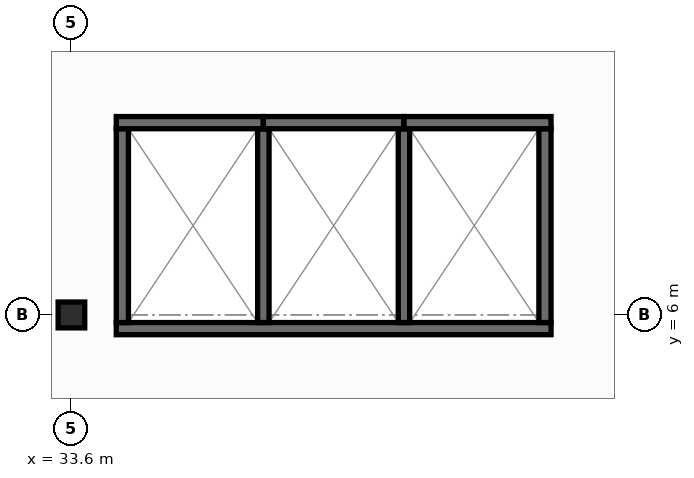
"""IFC4 building model, lengths in metres.
Left out: names, types, materials, properties, quantities, classifications, styles, units other than length and angle.
Written with IfcOpenShell. Run it as: python <this file> out.ifc"""

import sys

from ifc_helpers import new_model, si_unit, direction, frame, frame_2d, origin, origin_2d, place, context, subcontext, project, spatial, rectangle, i_section, extrude, element, save


model = new_model("IFC4")
c1 = context("Model", 3, precision=1e-05, world=origin(), true_north=direction((0.0, 1.0)))
c2 = subcontext(c1, "Body", "Model", "MODEL_VIEW")
j1 = project(units=[si_unit("LENGTHUNIT", "METRE"), si_unit("PLANEANGLEUNIT", "RADIAN")], contexts=[c1])
p1 = place(None, origin())
s1 = spatial("IfcSite", under=j1, at=p1, CompositionType="ELEMENT")
p2 = place(p1, origin())
s2 = spatial("IfcBuilding", under=s1, at=p2, CompositionType="ELEMENT")
p3 = place(p2, frame((0.0, 0.0, 26.45)))
s3 = spatial("IfcBuildingStorey", under=s2, at=p3, CompositionType="ELEMENT", Elevation=26.45)
p4 = place(p3, frame((33.6, 6.0, 0.0), z_axis=(0.0, 0.0, 1.0), x_axis=(1.0, 0.0, 0.0)))
e1 = element("IfcColumn", 1, at=p4, inside=s3, PredefinedType="COLUMN", context=c2, shape_type="SweptSolid", body=[
    extrude(i_section(OverallWidth=0.35, OverallDepth=0.34, WebThickness=0.016, FlangeThickness=0.028, at=origin_2d()), origin(), (0.0, 0.0, 1.0), 3.95),
])
p5 = place(p3, frame((34.19, 5.82, 0.0), z_axis=(0.0, 0.0, 1.0), x_axis=(1.0, 0.0, 0.0)))
e2 = element("IfcWall", 2, at=p5, inside=s3, PredefinedType="SHEAR", context=c2, shape_type="SweptSolid", body=[
    extrude(rectangle(XDim=5.72, YDim=0.16, at=frame_2d((2.86, 0.0))), origin(), (0.0, 0.0, 1.0), 3.71),
])
for number, where, z_axis, x_axis in (
    (3, (34.27, 5.9, 0.0), (0.0, 0.0, 1.0), (0.0, 1.0, 0.0)),
    (4, (39.83, 5.9, 0.0), (0.0, 0.0, 1.0), (0.0, 1.0, 0.0)),
):
    element("IfcWall", number, at=place(p3, frame(where, z_axis=z_axis, x_axis=x_axis)), inside=s3, PredefinedType="SHEAR", context=c2, shape_type="SweptSolid", body=[
        extrude(rectangle(XDim=2.55, YDim=0.16, at=frame_2d((1.275, 0.0))), origin(), (0.0, 0.0, 1.0), 3.71),
    ])
for number, where, z_axis, x_axis in (
    (5, (36.125, 5.9, 0.0), (0.0, 0.0, 1.0), (0.0, 1.0, 0.0)),
    (6, (37.975, 5.9, 0.0), (0.0, 0.0, 1.0), (0.0, 1.0, 0.0)),
):
    element("IfcWall", number, at=place(p3, frame(where, z_axis=z_axis, x_axis=x_axis)), inside=s3, PredefinedType="SHEAR", context=c2, shape_type="SweptSolid", body=[
        extrude(rectangle(XDim=2.55, YDim=0.15, at=frame_2d((1.275, 0.0))), origin(), (0.0, 0.0, 1.0), 3.71),
    ])
p6 = place(p3, frame((34.19, 8.53, 0.0), z_axis=(0.0, 0.0, 1.0), x_axis=(1.0, 0.0, 0.0)))
e7 = element("IfcWall", 7, at=p6, inside=s3, PredefinedType="SHEAR", context=c2, shape_type="SweptSolid", body=[
    extrude(rectangle(XDim=1.935, YDim=0.16, at=frame_2d((0.968, 0.0))), origin(), (0.0, 0.0, 1.0), 3.71),
])
p7 = place(p3, frame((36.125, 8.53, 0.0), z_axis=(0.0, 0.0, 1.0), x_axis=(1.0, 0.0, 0.0)))
e8 = element("IfcWall", 8, at=p7, inside=s3, PredefinedType="SHEAR", context=c2, shape_type="SweptSolid", body=[
    extrude(rectangle(XDim=1.85, YDim=0.16, at=frame_2d((0.925, 0.0))), origin(), (0.0, 0.0, 1.0), 3.71),
])
p8 = place(p3, frame((37.975, 8.53, 0.0), z_axis=(0.0, 0.0, 1.0), x_axis=(1.0, 0.0, 0.0)))
e9 = element("IfcWall", 9, at=p8, inside=s3, PredefinedType="SHEAR", context=c2, shape_type="SweptSolid", body=[
    extrude(rectangle(XDim=1.935, YDim=0.16, at=frame_2d((0.967, 0.0))), origin(), (0.0, 0.0, 1.0), 3.71),
])
save(model, sys.argv[1])
